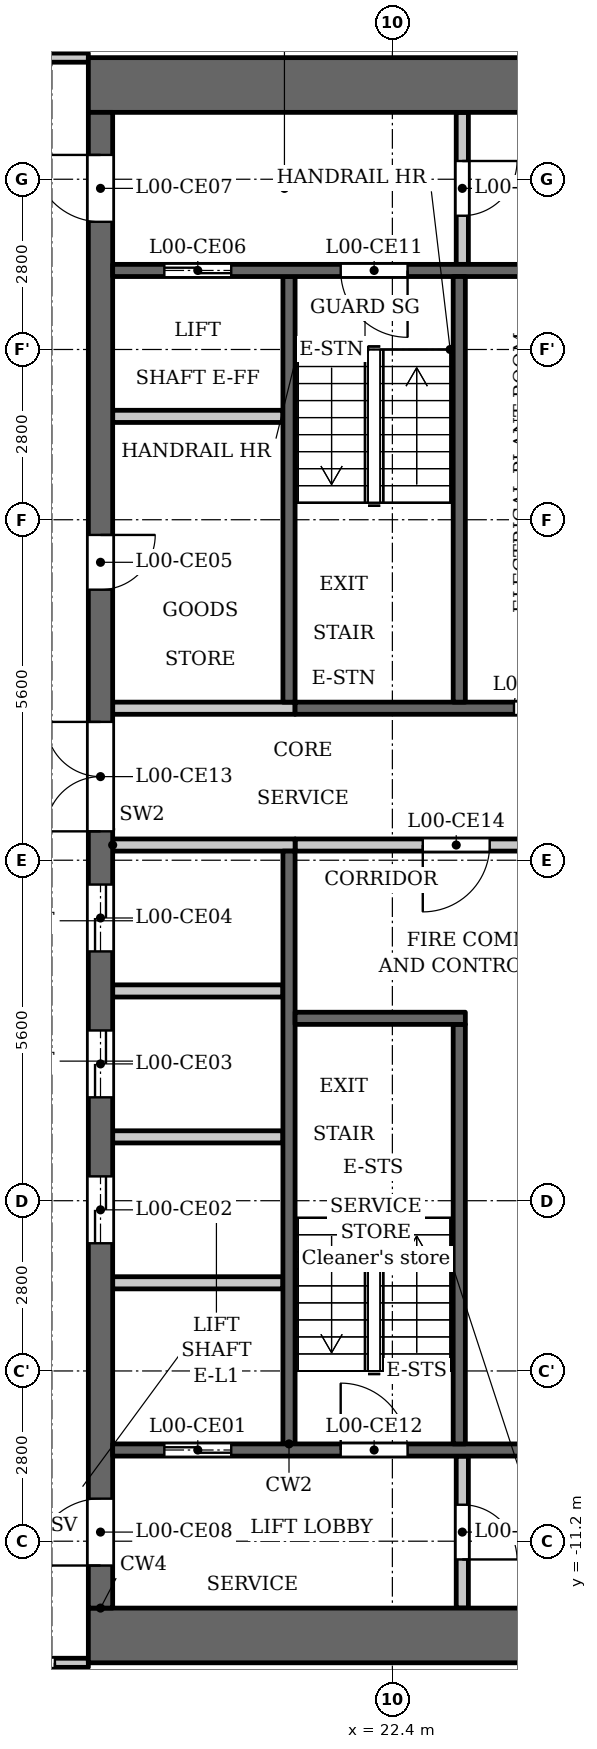
"""IFC4 building model, lengths in metres.
Left out: names, types, materials, properties, quantities, classifications, styles, units other than length and angle.
Written with IfcOpenShell. Run it as: python <this file> out.ifc"""

import sys

from ifc_helpers import new_model, si_unit, direction, frame, frame_2d, origin, place, context, subcontext, project, spatial, rectangle, extrude, element, fill, save


model = new_model("IFC4")
c1 = context("Model", 3, precision=1e-05, world=origin(), true_north=direction((0.0, 1.0)))
c2 = subcontext(c1, "Body", "Model", "MODEL_VIEW")
j1 = project(units=[si_unit("LENGTHUNIT", "METRE"), si_unit("PLANEANGLEUNIT", "RADIAN")], contexts=[c1])
p1 = place(None, origin())
s1 = spatial("IfcSite", under=j1, at=p1, CompositionType="ELEMENT")
p2 = place(p1, origin())
s2 = spatial("IfcBuilding", under=s1, at=p2, CompositionType="ELEMENT")
p3 = place(p2, origin())
s3 = spatial("IfcBuildingStorey", under=s2, at=p3, CompositionType="ELEMENT", Elevation=0.0)
p4 = place(p3, frame((20.7, 2.6, 0.0), z_axis=(0.0, 0.0, 1.0), x_axis=(0.0, 1.0, 0.0)))
e1 = element("IfcWall", 1, at=p4, inside=s3, PredefinedType="SHEAR", context=c2, shape_type="SweptSolid", body=[
    extrude(rectangle(XDim=7.0, YDim=0.2, at=frame_2d((3.5, 0.0))), origin(), (0.0, 0.0, 1.0), 6.15),
])
p5 = place(p3, frame((20.7, -9.6, 0.0), z_axis=(0.0, 0.0, 1.0), x_axis=(0.0, 1.0, 0.0)))
e2 = element("IfcWall", 2, at=p5, inside=s3, PredefinedType="SHEAR", context=c2, shape_type="SweptSolid", body=[
    extrude(rectangle(XDim=9.75, YDim=0.2, at=frame_2d((4.875, 0.0))), origin(), (0.0, 0.0, 1.0), 6.15),
])
p6 = place(p3, frame((20.8, 2.5, 0.0), z_axis=(0.0, 0.0, 1.0), x_axis=(1.0, 0.0, 0.0)))
e3 = element("IfcWall", 3, at=p6, inside=s3, PredefinedType="SHEAR", context=c2, shape_type="SweptSolid", body=[
    extrude(rectangle(XDim=5.3, YDim=0.2, at=frame_2d((2.65, 0.0))), origin(), (0.0, 0.0, 1.0), 6.15),
])
p7 = place(p6, frame((3.6, 0.0, 0.0)))
e4 = element("IfcOpeningElement", 4, at=p7, cuts=e3, PredefinedType="OPENING", context=c2, shape_type="SweptSolid", body=[
    extrude(rectangle(XDim=0.9, YDim=2.1, at=frame_2d((0.45, 1.05))), frame((0.0, 0.11, 0.0), z_axis=(0.0, -1.0, 0.0), x_axis=(1.0, 0.0, 0.0)), (0.0, 0.0, 1.0), 0.22),
])
p8 = place(p3, frame((20.8, 0.25, 0.0), z_axis=(0.0, 0.0, 1.0), x_axis=(1.0, 0.0, 0.0)))
e5 = element("IfcWall", 5, at=p8, inside=s3, PredefinedType="PARTITIONING", context=c2, shape_type="SweptSolid", body=[
    extrude(rectangle(XDim=5.3, YDim=0.2, at=frame_2d((2.65, 0.0))), origin(), (0.0, 0.0, 1.0), 6.15),
])
p9 = place(p8, frame((2.1, 0.0, 0.0)))
e6 = element("IfcOpeningElement", 6, at=p9, cuts=e5, PredefinedType="OPENING", context=c2, shape_type="SweptSolid", body=[
    extrude(rectangle(XDim=1.1, YDim=2.1, at=frame_2d((0.55, 1.05))), frame((0.0, 0.11, 0.0), z_axis=(0.0, -1.0, 0.0), x_axis=(1.0, 0.0, 0.0)), (0.0, 0.0, 1.0), 0.22),
])
for number, where, z_axis, x_axis in (
    (7, (17.4, 12.75, 0.0), (0.0, 0.0, 1.0), (1.0, 0.0, 0.0)),
    (8, (17.4, -12.75, 0.0), (0.0, 0.0, 1.0), (1.0, 0.0, 0.0)),
):
    element("IfcWall", number, at=place(p3, frame(where, z_axis=z_axis, x_axis=x_axis)), inside=s3, PredefinedType="SHEAR", context=c2, shape_type="SweptSolid", body=[
        extrude(rectangle(XDim=10.4, YDim=0.9, at=frame_2d((5.2, 0.0))), origin(), (0.0, 0.0, 1.0), 6.15),
    ])
p10 = place(p3, frame((17.6, -12.3, 0.0), z_axis=(0.0, 0.0, 1.0), x_axis=(0.0, 1.0, 0.0)))
e9 = element("IfcWall", 9, at=p10, inside=s3, PredefinedType="SHEAR", context=c2, shape_type="SweptSolid", body=[
    extrude(rectangle(XDim=24.6, YDim=0.4, at=frame_2d((12.3, 0.0))), origin(), (0.0, 0.0, 1.0), 6.15),
])
p11 = place(p10, frame((6.0, 0.0, 0.0)))
e10 = element("IfcOpeningElement", 10, at=p11, cuts=e9, PredefinedType="OPENING", context=c2, shape_type="SweptSolid", body=[
    extrude(rectangle(XDim=1.1, YDim=2.1, at=frame_2d((0.55, 1.05))), frame((0.0, 0.21, 0.0), z_axis=(0.0, -1.0, 0.0), x_axis=(1.0, 0.0, 0.0)), (0.0, 0.0, 1.0), 0.42),
])
p12 = place(p10, frame((8.4, 0.0, 0.0)))
e11 = element("IfcOpeningElement", 11, at=p12, cuts=e9, PredefinedType="OPENING", context=c2, shape_type="SweptSolid", body=[
    extrude(rectangle(XDim=1.1, YDim=2.1, at=frame_2d((0.55, 1.05))), frame((0.0, 0.21, 0.0), z_axis=(0.0, -1.0, 0.0), x_axis=(1.0, 0.0, 0.0)), (0.0, 0.0, 1.0), 0.42),
])
p13 = place(p10, frame((10.8, 0.0, 0.0)))
e12 = element("IfcOpeningElement", 12, at=p13, cuts=e9, PredefinedType="OPENING", context=c2, shape_type="SweptSolid", body=[
    extrude(rectangle(XDim=1.1, YDim=2.1, at=frame_2d((0.55, 1.05))), frame((0.0, 0.21, 0.0), z_axis=(0.0, -1.0, 0.0), x_axis=(1.0, 0.0, 0.0)), (0.0, 0.0, 1.0), 0.42),
])
p14 = place(p10, frame((16.75, 0.0, 0.0)))
e13 = element("IfcOpeningElement", 13, at=p14, cuts=e9, PredefinedType="OPENING", context=c2, shape_type="SweptSolid", body=[
    extrude(rectangle(XDim=0.9, YDim=2.1, at=frame_2d((0.45, 1.05))), frame((0.0, 0.21, 0.0), z_axis=(0.0, -1.0, 0.0), x_axis=(1.0, 0.0, 0.0)), (0.0, 0.0, 1.0), 0.42),
])
p15 = place(p10, frame((22.8, 0.0, 0.0)))
e14 = element("IfcOpeningElement", 14, at=p15, cuts=e9, PredefinedType="OPENING", context=c2, shape_type="SweptSolid", body=[
    extrude(rectangle(XDim=1.1, YDim=2.1, at=frame_2d((0.55, 1.05))), frame((0.0, 0.21, 0.0), z_axis=(0.0, -1.0, 0.0), x_axis=(1.0, 0.0, 0.0)), (0.0, 0.0, 1.0), 0.42),
])
p16 = place(p10, frame((0.7, 0.0, 0.0)))
e15 = element("IfcOpeningElement", 15, at=p16, cuts=e9, PredefinedType="OPENING", context=c2, shape_type="SweptSolid", body=[
    extrude(rectangle(XDim=1.1, YDim=2.1, at=frame_2d((0.55, 1.05))), frame((0.0, 0.21, 0.0), z_axis=(0.0, -1.0, 0.0), x_axis=(1.0, 0.0, 0.0)), (0.0, 0.0, 1.0), 0.42),
])
p17 = place(p10, frame((12.775, 0.0, 0.0)))
e16 = element("IfcOpeningElement", 16, at=p17, cuts=e9, PredefinedType="OPENING", context=c2, shape_type="SweptSolid", body=[
    extrude(rectangle(XDim=1.8, YDim=2.1, at=frame_2d((0.9, 1.05))), frame((0.0, 0.21, 0.0), z_axis=(0.0, -1.0, 0.0), x_axis=(1.0, 0.0, 0.0)), (0.0, 0.0, 1.0), 0.42),
])
p18 = place(p3, frame((23.55, 9.8, 0.0), z_axis=(0.0, 0.0, 1.0), x_axis=(0.0, 1.0, 0.0)))
e17 = element("IfcWall", 17, at=p18, inside=s3, PredefinedType="PARTITIONING", context=c2, shape_type="SweptSolid", body=[
    extrude(rectangle(XDim=2.5, YDim=0.2, at=frame_2d((1.25, 0.0))), origin(), (0.0, 0.0, 1.0), 6.15),
])
p19 = place(p18, frame((0.8, 0.0, 0.0)))
e18 = element("IfcOpeningElement", 18, at=p19, cuts=e17, PredefinedType="OPENING", context=c2, shape_type="SweptSolid", body=[
    extrude(rectangle(XDim=0.9, YDim=2.1, at=frame_2d((0.45, 1.05))), frame((0.0, 0.11, 0.0), z_axis=(0.0, -1.0, 0.0), x_axis=(1.0, 0.0, 0.0)), (0.0, 0.0, 1.0), 0.22),
])
p20 = place(p3, frame((23.55, -12.3, 0.0), z_axis=(0.0, 0.0, 1.0), x_axis=(0.0, 1.0, 0.0)))
e19 = element("IfcWall", 19, at=p20, inside=s3, PredefinedType="PARTITIONING", context=c2, shape_type="SweptSolid", body=[
    extrude(rectangle(XDim=2.5, YDim=0.2, at=frame_2d((1.25, 0.0))), origin(), (0.0, 0.0, 1.0), 6.15),
])
p21 = place(p20, frame((0.8, 0.0, 0.0)))
e20 = element("IfcOpeningElement", 20, at=p21, cuts=e19, PredefinedType="OPENING", context=c2, shape_type="SweptSolid", body=[
    extrude(rectangle(XDim=0.9, YDim=2.1, at=frame_2d((0.45, 1.05))), frame((0.0, 0.11, 0.0), z_axis=(0.0, -1.0, 0.0), x_axis=(1.0, 0.0, 0.0)), (0.0, 0.0, 1.0), 0.22),
])
p22 = place(p3, frame((17.8, -9.7, 0.0), z_axis=(0.0, 0.0, 1.0), x_axis=(1.0, 0.0, 0.0)))
e21 = element("IfcWall", 21, at=p22, inside=s3, PredefinedType="SHEAR", context=c2, shape_type="SweptSolid", body=[
    extrude(rectangle(XDim=8.3, YDim=0.2, at=frame_2d((4.15, 0.0))), origin(), (0.0, 0.0, 1.0), 6.15),
])
p23 = place(p22, frame((0.85, 0.0, 0.0)))
e22 = element("IfcOpeningElement", 22, at=p23, cuts=e21, PredefinedType="OPENING", context=c2, shape_type="SweptSolid", body=[
    extrude(rectangle(XDim=1.1, YDim=2.1, at=frame_2d((0.55, 1.05))), frame((0.0, 0.11, 0.0), z_axis=(0.0, -1.0, 0.0), x_axis=(1.0, 0.0, 0.0)), (0.0, 0.0, 1.0), 0.22),
])
p24 = place(p22, frame((3.75, 0.0, 0.0)))
e23 = element("IfcOpeningElement", 23, at=p24, cuts=e21, PredefinedType="OPENING", context=c2, shape_type="SweptSolid", body=[
    extrude(rectangle(XDim=1.1, YDim=2.1, at=frame_2d((0.55, 1.05))), frame((0.0, 0.11, 0.0), z_axis=(0.0, -1.0, 0.0), x_axis=(1.0, 0.0, 0.0)), (0.0, 0.0, 1.0), 0.22),
])
for number, where, z_axis, x_axis in (
    (24, (17.8, -6.95, 0.0), (0.0, 0.0, 1.0), (1.0, 0.0, 0.0)),
    (25, (17.8, -4.55, 0.0), (0.0, 0.0, 1.0), (1.0, 0.0, 0.0)),
    (26, (17.8, -2.15, 0.0), (0.0, 0.0, 1.0), (1.0, 0.0, 0.0)),
):
    element("IfcWall", number, at=place(p3, frame(where, z_axis=z_axis, x_axis=x_axis)), inside=s3, PredefinedType="PARTITIONING", context=c2, shape_type="SweptSolid", body=[
        extrude(rectangle(XDim=2.8, YDim=0.2, at=frame_2d((1.4, 0.0))), origin(), (0.0, 0.0, 1.0), 6.15),
    ])
for number, where, z_axis, x_axis in (
    (27, (17.8, 0.25, 0.0), (0.0, 0.0, 1.0), (1.0, 0.0, 0.0)),
    (28, (17.8, 2.5, 0.0), (0.0, 0.0, 1.0), (1.0, 0.0, 0.0)),
):
    element("IfcWall", number, at=place(p3, frame(where, z_axis=z_axis, x_axis=x_axis)), inside=s3, PredefinedType="PARTITIONING", context=c2, shape_type="SweptSolid", body=[
        extrude(rectangle(XDim=3.0, YDim=0.2, at=frame_2d((1.5, 0.0))), origin(), (0.0, 0.0, 1.0), 6.15),
    ])
p25 = place(p3, frame((17.8, 7.3, 0.0), z_axis=(0.0, 0.0, 1.0), x_axis=(1.0, 0.0, 0.0)))
e29 = element("IfcWall", 29, at=p25, inside=s3, PredefinedType="PARTITIONING", context=c2, shape_type="SweptSolid", body=[
    extrude(rectangle(XDim=2.8, YDim=0.2, at=frame_2d((1.4, 0.0))), origin(), (0.0, 0.0, 1.0), 6.15),
])
p26 = place(p3, frame((17.8, 9.7, 0.0), z_axis=(0.0, 0.0, 1.0), x_axis=(1.0, 0.0, 0.0)))
e30 = element("IfcWall", 30, at=p26, inside=s3, PredefinedType="SHEAR", context=c2, shape_type="SweptSolid", body=[
    extrude(rectangle(XDim=8.3, YDim=0.2, at=frame_2d((4.15, 0.0))), origin(), (0.0, 0.0, 1.0), 6.15),
])
p27 = place(p26, frame((0.85, 0.0, 0.0)))
e31 = element("IfcOpeningElement", 31, at=p27, cuts=e30, PredefinedType="OPENING", context=c2, shape_type="SweptSolid", body=[
    extrude(rectangle(XDim=1.1, YDim=2.1, at=frame_2d((0.55, 1.05))), frame((0.0, 0.11, 0.0), z_axis=(0.0, -1.0, 0.0), x_axis=(1.0, 0.0, 0.0)), (0.0, 0.0, 1.0), 0.22),
])
p28 = place(p26, frame((3.75, 0.0, 0.0)))
e32 = element("IfcOpeningElement", 32, at=p28, cuts=e30, PredefinedType="OPENING", context=c2, shape_type="SweptSolid", body=[
    extrude(rectangle(XDim=1.1, YDim=2.1, at=frame_2d((0.55, 1.05))), frame((0.0, 0.11, 0.0), z_axis=(0.0, -1.0, 0.0), x_axis=(1.0, 0.0, 0.0)), (0.0, 0.0, 1.0), 0.22),
])
p29 = place(p3, frame((23.5, 2.6, 0.0), z_axis=(0.0, 0.0, 1.0), x_axis=(0.0, 1.0, 0.0)))
e33 = element("IfcWall", 33, at=p29, inside=s3, PredefinedType="SHEAR", context=c2, shape_type="SweptSolid", body=[
    extrude(rectangle(XDim=7.0, YDim=0.2, at=frame_2d((3.5, 0.0))), origin(), (0.0, 0.0, 1.0), 6.15),
])
p30 = place(p3, frame((23.5, -9.6, 0.0), z_axis=(0.0, 0.0, 1.0), x_axis=(0.0, 1.0, 0.0)))
e34 = element("IfcWall", 34, at=p30, inside=s3, PredefinedType="SHEAR", context=c2, shape_type="SweptSolid", body=[
    extrude(rectangle(XDim=6.9, YDim=0.2, at=frame_2d((3.45, 0.0))), origin(), (0.0, 0.0, 1.0), 6.15),
])
p31 = place(p3, frame((20.8, -2.6, 0.0), z_axis=(0.0, 0.0, 1.0), x_axis=(1.0, 0.0, 0.0)))
e35 = element("IfcWall", 35, at=p31, inside=s3, PredefinedType="SHEAR", context=c2, shape_type="SweptSolid", body=[
    extrude(rectangle(XDim=2.8, YDim=0.2, at=frame_2d((1.4, 0.0))), origin(), (0.0, 0.0, 1.0), 6.15),
])
p32 = place(p3, frame((-17.4, -13.2, 0.0), z_axis=(0.0, 0.0, 1.0), x_axis=(1.0, 0.0, 0.0)))
e36 = element("IfcWall", 36, at=p32, inside=s3, PredefinedType="PARTITIONING", context=c2, shape_type="SweptSolid", body=[
    extrude(rectangle(XDim=34.8, YDim=0.15, at=frame_2d((17.4, 0.0))), origin(), (0.0, 0.0, 1.0), 6.15),
])
p33 = place(p32, frame((13.95, 0.0, 0.0)))
e37 = element("IfcOpeningElement", 37, at=p33, cuts=e36, PredefinedType="OPENING", context=c2, shape_type="SweptSolid", body=[
    extrude(rectangle(XDim=1.8, YDim=2.1, at=frame_2d((0.9, 1.05))), frame((0.0, 0.085, 0.0), z_axis=(0.0, -1.0, 0.0), x_axis=(1.0, 0.0, 0.0)), (0.0, 0.0, 1.0), 0.17),
])
p34 = place(p32, frame((33.05, 0.0, 0.0)))
e38 = element("IfcOpeningElement", 38, at=p34, cuts=e36, PredefinedType="OPENING", context=c2, shape_type="SweptSolid", body=[
    extrude(rectangle(XDim=1.2, YDim=2.1, at=frame_2d((0.6, 1.05))), frame((0.0, 0.085, 0.0), z_axis=(0.0, -1.0, 0.0), x_axis=(1.0, 0.0, 0.0)), (0.0, 0.0, 1.0), 0.17),
])
p35 = place(p32, frame((0.65, 0.0, 0.0)))
e39 = element("IfcOpeningElement", 39, at=p35, cuts=e36, PredefinedType="OPENING", context=c2, shape_type="SweptSolid", body=[
    extrude(rectangle(XDim=1.2, YDim=2.1, at=frame_2d((0.6, 1.05))), frame((0.0, 0.085, 0.0), z_axis=(0.0, -1.0, 0.0), x_axis=(1.0, 0.0, 0.0)), (0.0, 0.0, 1.0), 0.17),
])
p36 = place(p3, frame((-17.4, 13.2, 0.0), z_axis=(0.0, 0.0, 1.0), x_axis=(1.0, 0.0, 0.0)))
e40 = element("IfcWall", 40, at=p36, inside=s3, PredefinedType="PARTITIONING", context=c2, shape_type="SweptSolid", body=[
    extrude(rectangle(XDim=34.8, YDim=0.15, at=frame_2d((17.4, 0.0))), origin(), (0.0, 0.0, 1.0), 6.15),
])
p37 = place(p36, frame((3.05, 0.0, 0.0)))
e41 = element("IfcOpeningElement", 41, at=p37, cuts=e40, PredefinedType="OPENING", context=c2, shape_type="SweptSolid", body=[
    extrude(rectangle(XDim=1.8, YDim=2.1, at=frame_2d((0.9, 1.05))), frame((0.0, 0.085, 0.0), z_axis=(0.0, -1.0, 0.0), x_axis=(1.0, 0.0, 0.0)), (0.0, 0.0, 1.0), 0.17),
])
p38 = place(p36, frame((0.75, 0.0, 0.0)))
e42 = element("IfcOpeningElement", 42, at=p38, cuts=e40, PredefinedType="OPENING", context=c2, shape_type="SweptSolid", body=[
    extrude(rectangle(XDim=1.0, YDim=2.1, at=frame_2d((0.5, 1.05))), frame((0.0, 0.085, 0.0), z_axis=(0.0, -1.0, 0.0), x_axis=(1.0, 0.0, 0.0)), (0.0, 0.0, 1.0), 0.17),
])
p39 = place(p36, frame((33.15, 0.0, 0.0)))
e43 = element("IfcOpeningElement", 43, at=p39, cuts=e40, PredefinedType="OPENING", context=c2, shape_type="SweptSolid", body=[
    extrude(rectangle(XDim=1.0, YDim=2.1, at=frame_2d((0.5, 1.05))), frame((0.0, 0.085, 0.0), z_axis=(0.0, -1.0, 0.0), x_axis=(1.0, 0.0, 0.0)), (0.0, 0.0, 1.0), 0.17),
])
p40 = place(p23, origin())
e44 = element("IfcDoor", 44, at=p40, inside=s3, OperationType="DOUBLE_DOOR_SLIDING", PredefinedType="DOOR", context=c2, shape_type="SweptSolid", body=[
    extrude(rectangle(XDim=1.1, YDim=2.1, at=frame_2d((0.55, 1.05))), frame((0.0, 0.025, 0.0), z_axis=(0.0, -1.0, 0.0), x_axis=(1.0, 0.0, 0.0)), (0.0, 0.0, 1.0), 0.05),
])
fill(e22, e44)
p41 = place(p11, origin())
e45 = element("IfcDoor", 45, at=p41, inside=s3, OperationType="DOUBLE_DOOR_SLIDING", PredefinedType="DOOR", context=c2, shape_type="SweptSolid", body=[
    extrude(rectangle(XDim=1.1, YDim=2.1, at=frame_2d((0.55, 1.05))), frame((0.0, 0.025, 0.0), z_axis=(0.0, -1.0, 0.0), x_axis=(1.0, 0.0, 0.0)), (0.0, 0.0, 1.0), 0.05),
])
fill(e10, e45)
p42 = place(p12, origin())
e46 = element("IfcDoor", 46, at=p42, inside=s3, OperationType="DOUBLE_DOOR_SLIDING", PredefinedType="DOOR", context=c2, shape_type="SweptSolid", body=[
    extrude(rectangle(XDim=1.1, YDim=2.1, at=frame_2d((0.55, 1.05))), frame((0.0, 0.025, 0.0), z_axis=(0.0, -1.0, 0.0), x_axis=(1.0, 0.0, 0.0)), (0.0, 0.0, 1.0), 0.05),
])
fill(e11, e46)
p43 = place(p13, origin())
e47 = element("IfcDoor", 47, at=p43, inside=s3, OperationType="DOUBLE_DOOR_SLIDING", PredefinedType="DOOR", context=c2, shape_type="SweptSolid", body=[
    extrude(rectangle(XDim=1.1, YDim=2.1, at=frame_2d((0.55, 1.05))), frame((0.0, 0.025, 0.0), z_axis=(0.0, -1.0, 0.0), x_axis=(1.0, 0.0, 0.0)), (0.0, 0.0, 1.0), 0.05),
])
fill(e12, e47)
p44 = place(p14, origin())
e48 = element("IfcDoor", 48, at=p44, inside=s3, OperationType="SINGLE_SWING_RIGHT", PredefinedType="DOOR", context=c2, shape_type="SweptSolid", body=[
    extrude(rectangle(XDim=0.9, YDim=2.1, at=frame_2d((0.45, 1.05))), frame((0.0, 0.025, 0.0), z_axis=(0.0, -1.0, 0.0), x_axis=(1.0, 0.0, 0.0)), (0.0, 0.0, 1.0), 0.05),
])
fill(e13, e48)
p45 = place(p27, origin())
e49 = element("IfcDoor", 49, at=p45, inside=s3, OperationType="DOUBLE_DOOR_SLIDING", PredefinedType="DOOR", context=c2, shape_type="SweptSolid", body=[
    extrude(rectangle(XDim=1.1, YDim=2.1, at=frame_2d((0.55, 1.05))), frame((0.0, 0.025, 0.0), z_axis=(0.0, -1.0, 0.0), x_axis=(1.0, 0.0, 0.0)), (0.0, 0.0, 1.0), 0.05),
])
fill(e31, e49)
p46 = place(p15, origin())
e50 = element("IfcDoor", 50, at=p46, inside=s3, OperationType="SINGLE_SWING_LEFT", PredefinedType="DOOR", context=c2, shape_type="SweptSolid", body=[
    extrude(rectangle(XDim=1.1, YDim=2.1, at=frame_2d((0.55, 1.05))), frame((0.0, 0.025, 0.0), z_axis=(0.0, -1.0, 0.0), x_axis=(1.0, 0.0, 0.0)), (0.0, 0.0, 1.0), 0.05),
])
fill(e14, e50)
p47 = place(p16, origin())
e51 = element("IfcDoor", 51, at=p47, inside=s3, OperationType="SINGLE_SWING_RIGHT", PredefinedType="DOOR", context=c2, shape_type="SweptSolid", body=[
    extrude(rectangle(XDim=1.1, YDim=2.1, at=frame_2d((0.55, 1.05))), frame((0.0, 0.025, 0.0), z_axis=(0.0, -1.0, 0.0), x_axis=(1.0, 0.0, 0.0)), (0.0, 0.0, 1.0), 0.05),
])
fill(e15, e51)
p48 = place(p19, origin())
e52 = element("IfcDoor", 52, at=p48, inside=s3, OperationType="SINGLE_SWING_RIGHT", PredefinedType="DOOR", context=c2, shape_type="SweptSolid", body=[
    extrude(rectangle(XDim=0.9, YDim=2.1, at=frame_2d((0.45, 1.05))), frame((0.0, 0.025, 0.0), z_axis=(0.0, -1.0, 0.0), x_axis=(1.0, 0.0, 0.0)), (0.0, 0.0, 1.0), 0.05),
])
fill(e18, e52)
p49 = place(p21, origin())
e53 = element("IfcDoor", 53, at=p49, inside=s3, OperationType="SINGLE_SWING_LEFT", PredefinedType="DOOR", context=c2, shape_type="SweptSolid", body=[
    extrude(rectangle(XDim=0.9, YDim=2.1, at=frame_2d((0.45, 1.05))), frame((0.0, 0.025, 0.0), z_axis=(0.0, -1.0, 0.0), x_axis=(1.0, 0.0, 0.0)), (0.0, 0.0, 1.0), 0.05),
])
fill(e20, e53)
p50 = place(p28, origin())
e54 = element("IfcDoor", 54, at=p50, inside=s3, OperationType="SINGLE_SWING_RIGHT", PredefinedType="DOOR", context=c2, shape_type="SweptSolid", body=[
    extrude(rectangle(XDim=1.1, YDim=2.1, at=frame_2d((0.55, 1.05))), frame((0.0, 0.025, 0.0), z_axis=(0.0, -1.0, 0.0), x_axis=(1.0, 0.0, 0.0)), (0.0, 0.0, 1.0), 0.05),
])
fill(e32, e54)
p51 = place(p24, origin())
e55 = element("IfcDoor", 55, at=p51, inside=s3, OperationType="SINGLE_SWING_RIGHT", PredefinedType="DOOR", context=c2, shape_type="SweptSolid", body=[
    extrude(rectangle(XDim=1.1, YDim=2.1, at=frame_2d((0.55, 1.05))), frame((0.0, 0.025, 0.0), z_axis=(0.0, -1.0, 0.0), x_axis=(1.0, 0.0, 0.0)), (0.0, 0.0, 1.0), 0.05),
])
fill(e23, e55)
p52 = place(p17, origin())
e56 = element("IfcDoor", 56, at=p52, inside=s3, OperationType="DOUBLE_DOOR_SINGLE_SWING", PredefinedType="DOOR", context=c2, shape_type="SweptSolid", body=[
    extrude(rectangle(XDim=1.8, YDim=2.1, at=frame_2d((0.9, 1.05))), frame((0.0, 0.025, 0.0), z_axis=(0.0, -1.0, 0.0), x_axis=(1.0, 0.0, 0.0)), (0.0, 0.0, 1.0), 0.05),
])
fill(e16, e56)
p53 = place(p9, origin())
e57 = element("IfcDoor", 57, at=p53, inside=s3, OperationType="SINGLE_SWING_LEFT", PredefinedType="DOOR", context=c2, shape_type="SweptSolid", body=[
    extrude(rectangle(XDim=1.1, YDim=2.1, at=frame_2d((0.55, 1.05))), frame((0.0, 0.025, 0.0), z_axis=(0.0, -1.0, 0.0), x_axis=(1.0, 0.0, 0.0)), (0.0, 0.0, 1.0), 0.05),
])
fill(e6, e57)
p54 = place(p7, origin())
e58 = element("IfcDoor", 58, at=p54, inside=s3, OperationType="SINGLE_SWING_LEFT", PredefinedType="DOOR", context=c2, shape_type="SweptSolid", body=[
    extrude(rectangle(XDim=0.9, YDim=2.1, at=frame_2d((0.45, 1.05))), frame((0.0, 0.025, 0.0), z_axis=(0.0, -1.0, 0.0), x_axis=(1.0, 0.0, 0.0)), (0.0, 0.0, 1.0), 0.05),
])
fill(e4, e58)
p55 = place(p34, origin())
e59 = element("IfcDoor", 59, at=p55, inside=s3, OperationType="SINGLE_SWING_RIGHT", PredefinedType="DOOR", context=c2, shape_type="SweptSolid", body=[
    extrude(rectangle(XDim=1.2, YDim=2.1, at=frame_2d((0.6, 1.05))), frame((0.0, 0.025, 0.0), z_axis=(0.0, -1.0, 0.0), x_axis=(1.0, 0.0, 0.0)), (0.0, 0.0, 1.0), 0.05),
])
fill(e38, e59)
save(model, sys.argv[1])
